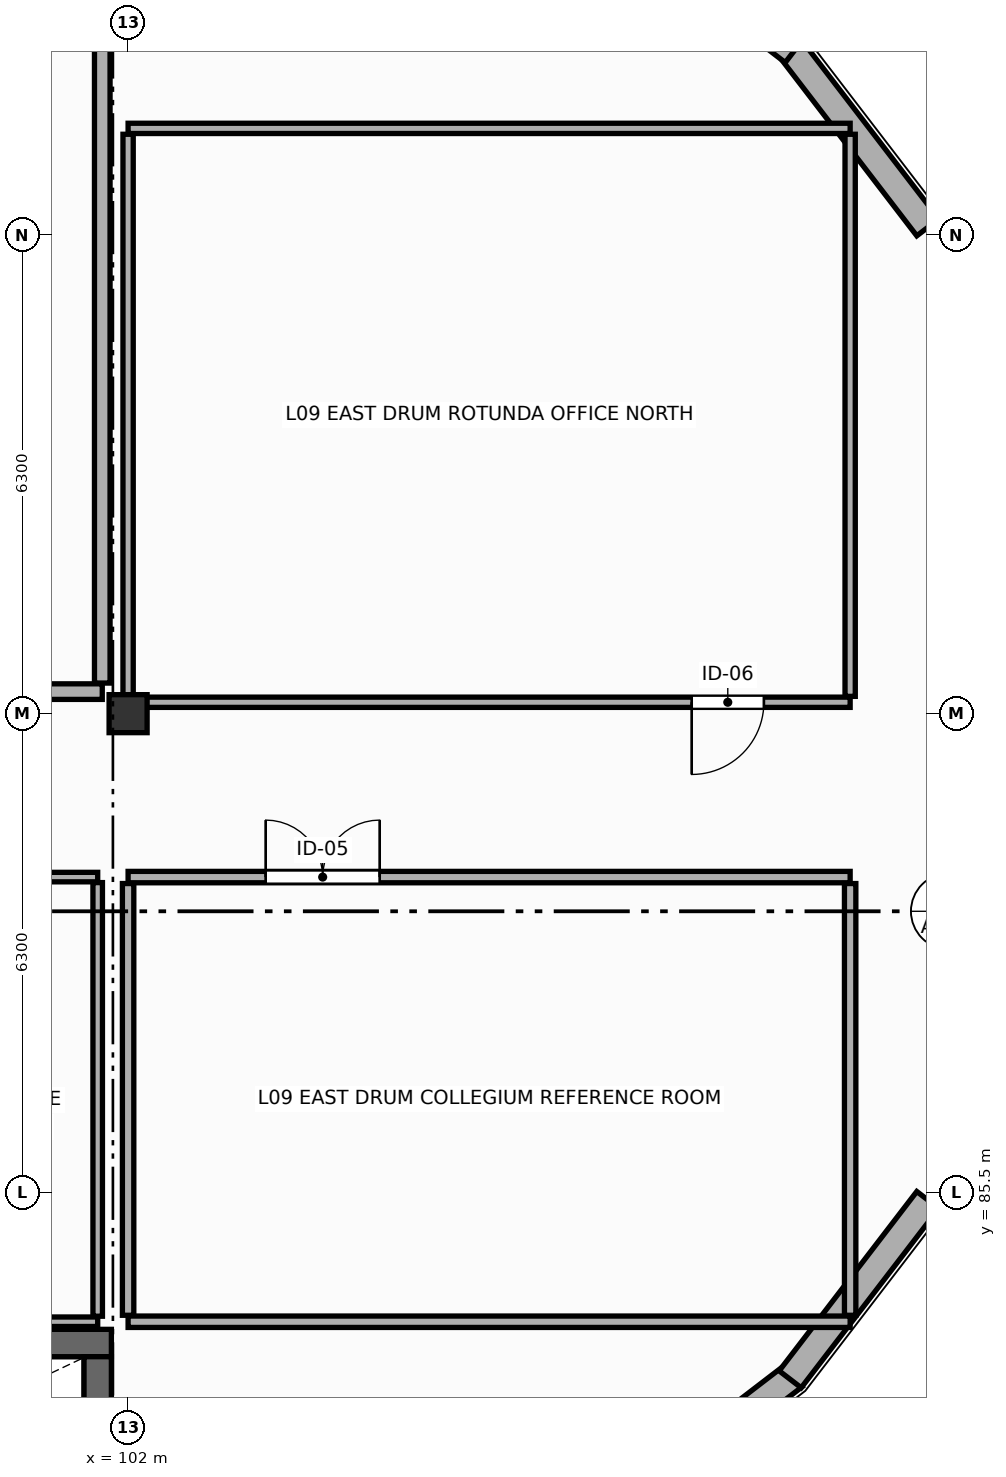
"""IFC4 building model, lengths in metres.
Left out: names, types, materials, properties, quantities, classifications, styles, units other than length and angle.
Written with IfcOpenShell. Run it as: python <this file> out.ifc"""

import sys

from ifc_helpers import new_model, si_unit, direction, frame, frame_2d, origin, origin_2d, place, context, subcontext, project, spatial, rectangle, extrude, element, fill, save


model = new_model("IFC4")
c1 = context("Model", 3, precision=1e-05, world=origin(), true_north=direction((0.0, 1.0)))
c2 = subcontext(c1, "Body", "Model", "MODEL_VIEW")
j1 = project(units=[si_unit("LENGTHUNIT", "METRE"), si_unit("PLANEANGLEUNIT", "RADIAN")], contexts=[c1])
p1 = place(None, origin())
s1 = spatial("IfcSite", under=j1, at=p1, CompositionType="ELEMENT")
p2 = place(p1, origin())
s2 = spatial("IfcBuilding", under=s1, at=p2, CompositionType="ELEMENT")
p3 = place(p2, frame((0.0, 0.0, 35.4)))
s3 = spatial("IfcBuildingStorey", under=s2, at=p3, CompositionType="ELEMENT", Elevation=35.4)
p4 = place(p3, frame((102.0, 91.8, 0.0), z_axis=(0.0, 0.0, 1.0), x_axis=(1.0, 0.0, 0.0)))
e1 = element("IfcColumn", 1, at=p4, inside=s3, PredefinedType="COLUMN", context=c2, shape_type="SweptSolid", body=[
    extrude(rectangle(XDim=0.5, YDim=0.5, at=origin_2d()), origin(), (0.0, 0.0, 1.0), 4.2),
])
p5 = place(p3, frame((108.398, 81.278, 0.0), z_axis=(0.0, 0.0, 1.0), x_axis=(0.793361877219, 0.608750303306, 0.0)))
e2 = element("IfcWall", 2, at=p5, inside=s3, PredefinedType="ELEMENTEDWALL", context=c2, shape_type="SweptSolid", body=[
    extrude(rectangle(XDim=2.974, YDim=0.365, at=frame_2d((1.487, 0.0))), origin(), (0.0, 0.0, 1.0), 2.995),
])
p6 = place(p5, frame((1.087, 0.0, 0.85)))
e3 = element("IfcOpeningElement", 3, at=p6, cuts=e2, PredefinedType="OPENING", context=c2, shape_type="SweptSolid", body=[
    extrude(rectangle(XDim=0.8, YDim=1.7, at=frame_2d((0.4, 0.85))), frame((0.0, 0.192, 0.0), z_axis=(0.0, -1.0, 0.0), x_axis=(1.0, 0.0, 0.0)), (0.0, 0.0, 1.0), 0.385),
])
p7 = place(p3, frame((110.711, 83.042, 0.0), z_axis=(0.0, 0.0, 1.0), x_axis=(0.608710660898, 0.793392293452, 0.0)))
e4 = element("IfcWall", 4, at=p7, inside=s3, PredefinedType="ELEMENTEDWALL", context=c2, shape_type="SweptSolid", body=[
    extrude(rectangle(XDim=2.974, YDim=0.365, at=frame_2d((1.487, 0.0))), origin(), (0.0, 0.0, 1.0), 3.095),
])
p8 = place(p3, frame((112.522, 98.198, 0.0), z_axis=(0.0, 0.0, 1.0), x_axis=(-0.608750303306, 0.793361877219, 0.0)))
e5 = element("IfcWall", 5, at=p8, inside=s3, PredefinedType="ELEMENTEDWALL", context=c2, shape_type="SweptSolid", body=[
    extrude(rectangle(XDim=2.974, YDim=0.365, at=frame_2d((1.487, 0.0))), origin(), (0.0, 0.0, 1.0), 3.095),
])
p9 = place(p3, frame((110.757, 100.511, 0.0), z_axis=(0.0, 0.0, 1.0), x_axis=(-0.793361877219, 0.608750303306, 0.0)))
e6 = element("IfcWall", 6, at=p9, inside=s3, PredefinedType="ELEMENTEDWALL", context=c2, shape_type="SweptSolid", body=[
    extrude(rectangle(XDim=2.974, YDim=0.365, at=frame_2d((1.487, 0.0))), origin(), (0.0, 0.0, 1.0), 2.995),
])
p10 = place(p9, frame((1.087, 0.0, 0.85)))
e7 = element("IfcOpeningElement", 7, at=p10, cuts=e6, PredefinedType="OPENING", context=c2, shape_type="SweptSolid", body=[
    extrude(rectangle(XDim=0.8, YDim=1.7, at=frame_2d((0.4, 0.85))), frame((0.0, 0.192, 0.0), z_axis=(0.0, -1.0, 0.0), x_axis=(1.0, 0.0, 0.0)), (0.0, 0.0, 1.0), 0.385),
])
p11 = place(p3, frame((102.0, 103.9, 4.2), z_axis=(0.0, 0.0, 1.0), x_axis=(0.0, -1.0, 0.0)))
e8 = element("IfcWall", 8, at=p11, inside=s3, PredefinedType="PARAPET", context=c2, shape_type="SweptSolid", body=[
    extrude(rectangle(XDim=24.2, YDim=0.245, at=frame_2d((12.1, 0.0))), origin(), (0.0, 0.0, 1.0), 1.15),
])
p12 = place(p3, frame((92.42, 83.52, 0.0), z_axis=(0.0, 0.0, 1.0), x_axis=(1.0, 0.0, 0.0)))
e9 = element("IfcWall", 9, at=p12, inside=s3, PredefinedType="SHEAR", context=c2, shape_type="SweptSolid", body=[
    extrude(rectangle(XDim=9.36, YDim=0.36, at=frame_2d((4.68, 0.0))), origin(), (0.0, 0.0, 1.0), 3.98),
])
p13 = place(p3, frame((101.6, 83.34, 0.0), z_axis=(0.0, 0.0, 1.0), x_axis=(0.0, -1.0, 0.0)))
e10 = element("IfcWall", 10, at=p13, inside=s3, PredefinedType="SHEAR", context=c2, shape_type="SweptSolid", body=[
    extrude(rectangle(XDim=3.36, YDim=0.36, at=frame_2d((1.68, 0.0))), origin(), (0.0, 0.0, 1.0), 3.98),
])
p14 = place(p3, frame((99.1, 89.65, 0.0), z_axis=(0.0, 0.0, 1.0), x_axis=(1.0, 0.0, 0.0)))
e11 = element("IfcWall", 11, at=p14, inside=s3, PredefinedType="PARTITIONING", context=c2, shape_type="SweptSolid", body=[
    extrude(rectangle(XDim=2.5, YDim=0.125, at=frame_2d((1.25, 0.0))), origin(), (0.0, 0.0, 1.0), 3.095),
])
p15 = place(p14, frame((0.75, 0.0, 0.0)))
e12 = element("IfcOpeningElement", 12, at=p15, cuts=e11, PredefinedType="OPENING", context=c2, shape_type="SweptSolid", body=[
    extrude(rectangle(XDim=1.0, YDim=2.1, at=frame_2d((0.5, 1.05))), frame((0.0, 0.073, 0.0), z_axis=(0.0, -1.0, 0.0), x_axis=(1.0, 0.0, 0.0)), (0.0, 0.0, 1.0), 0.145),
])
p16 = place(p3, frame((101.6, 83.8, 0.0), z_axis=(0.0, 0.0, 1.0), x_axis=(-1.0, 0.0, 0.0)))
e13 = element("IfcWall", 13, at=p16, inside=s3, PredefinedType="PARTITIONING", context=c2, shape_type="SweptSolid", body=[
    extrude(rectangle(XDim=2.5, YDim=0.125, at=frame_2d((1.25, 0.0))), origin(), (0.0, 0.0, 1.0), 3.095),
])
p17 = place(p3, frame((101.6, 89.577, 0.0), z_axis=(0.0, 0.0, 1.0), x_axis=(0.0, -1.0, 0.0)))
e14 = element("IfcWall", 14, at=p17, inside=s3, PredefinedType="PARTITIONING", context=c2, shape_type="SweptSolid", body=[
    extrude(rectangle(XDim=5.705, YDim=0.125, at=frame_2d((2.853, 0.0))), origin(), (0.0, 0.0, 1.0), 3.095),
])
p18 = place(p3, frame((101.66, 92.09, 0.0), z_axis=(0.0, 0.0, 1.0), x_axis=(-1.0, 0.0, 0.0)))
e15 = element("IfcWall", 15, at=p18, inside=s3, PredefinedType="STANDARD", context=c2, shape_type="SweptSolid", body=[
    extrude(rectangle(XDim=5.634, YDim=0.205, at=frame_2d((2.817, 0.0))), origin(), (0.0, 0.0, 1.0), 3.095),
])
p19 = place(p18, frame((2.47, 0.0, 0.0)))
e16 = element("IfcOpeningElement", 16, at=p19, cuts=e15, PredefinedType="OPENING", context=c2, shape_type="SweptSolid", body=[
    extrude(rectangle(XDim=1.4, YDim=2.25, at=frame_2d((0.7, 1.125))), frame((0.0, 0.113, 0.0), z_axis=(0.0, -1.0, 0.0), x_axis=(1.0, 0.0, 0.0)), (0.0, 0.0, 1.0), 0.225),
])
p20 = place(p3, frame((101.66, 103.996, 0.0), z_axis=(0.0, 0.0, 1.0), x_axis=(0.0, -1.0, 0.0)))
e17 = element("IfcWall", 17, at=p20, inside=s3, PredefinedType="STANDARD", context=c2, shape_type="SweptSolid", body=[
    extrude(rectangle(XDim=11.794, YDim=0.205, at=frame_2d((5.897, 0.0))), origin(), (0.0, 0.0, 1.0), 3.095),
])
p21 = place(p3, frame((102.0, 99.5, 0.0), z_axis=(0.0, 0.0, 1.0), x_axis=(1.0, 0.0, 0.0)))
e18 = element("IfcWall", 18, at=p21, inside=s3, PredefinedType="PARTITIONING", context=c2, shape_type="SweptSolid", body=[
    extrude(rectangle(XDim=9.5, YDim=0.135, at=frame_2d((4.75, 0.0))), origin(), (0.0, 0.0, 1.0), 2.995),
])
p22 = place(p3, frame((111.5, 91.95, 0.0), z_axis=(0.0, 0.0, 1.0), x_axis=(-1.0, 0.0, 0.0)))
e19 = element("IfcWall", 19, at=p22, inside=s3, PredefinedType="PARTITIONING", context=c2, shape_type="SweptSolid", body=[
    extrude(rectangle(XDim=9.5, YDim=0.135, at=frame_2d((4.75, 0.0))), origin(), (0.0, 0.0, 1.0), 2.995),
])
p23 = place(p22, frame((1.135, 0.0, 0.0)))
e20 = element("IfcOpeningElement", 20, at=p23, cuts=e19, PredefinedType="OPENING", context=c2, shape_type="SweptSolid", body=[
    extrude(rectangle(XDim=0.95, YDim=2.15, at=frame_2d((0.475, 1.075))), frame((0.0, 0.077, 0.0), z_axis=(0.0, -1.0, 0.0), x_axis=(1.0, 0.0, 0.0)), (0.0, 0.0, 1.0), 0.155),
])
for number, where, z_axis, x_axis in (
    (21, (102.0, 92.028, 0.0), (0.0, 0.0, 1.0), (0.0, 1.0, 0.0)),
    (22, (111.5, 99.423, 0.0), (0.0, 0.0, 1.0), (0.0, -1.0, 0.0)),
):
    element("IfcWall", number, at=place(p3, frame(where, z_axis=z_axis, x_axis=x_axis)), inside=s3, PredefinedType="PARTITIONING", context=c2, shape_type="SweptSolid", body=[
        extrude(rectangle(XDim=7.395, YDim=0.135, at=frame_2d((3.698, 0.0))), origin(), (0.0, 0.0, 1.0), 3.095),
    ])
p24 = place(p3, frame((102.0, 89.65, 0.0), z_axis=(0.0, 0.0, 1.0), x_axis=(1.0, 0.0, 0.0)))
e23 = element("IfcWall", 23, at=p24, inside=s3, PredefinedType="PARTITIONING", context=c2, shape_type="SweptSolid", body=[
    extrude(rectangle(XDim=9.5, YDim=0.15, at=frame_2d((4.75, 0.0))), origin(), (0.0, 0.0, 1.0), 2.995),
])
p25 = place(p24, frame((1.81, 0.0, 0.0)))
e24 = element("IfcOpeningElement", 24, at=p25, cuts=e23, PredefinedType="OPENING", context=c2, shape_type="SweptSolid", body=[
    extrude(rectangle(XDim=1.5, YDim=2.35, at=frame_2d((0.75, 1.175))), frame((0.0, 0.085, 0.0), z_axis=(0.0, -1.0, 0.0), x_axis=(1.0, 0.0, 0.0)), (0.0, 0.0, 1.0), 0.17),
])
p26 = place(p3, frame((111.5, 83.8, 0.0), z_axis=(0.0, 0.0, 1.0), x_axis=(-1.0, 0.0, 0.0)))
e25 = element("IfcWall", 25, at=p26, inside=s3, PredefinedType="PARTITIONING", context=c2, shape_type="SweptSolid", body=[
    extrude(rectangle(XDim=9.5, YDim=0.15, at=frame_2d((4.75, 0.0))), origin(), (0.0, 0.0, 1.0), 2.995),
])
p27 = place(p3, frame((102.0, 83.885, 0.0), z_axis=(0.0, 0.0, 1.0), x_axis=(0.0, 1.0, 0.0)))
e26 = element("IfcWall", 26, at=p27, inside=s3, PredefinedType="PARTITIONING", context=c2, shape_type="SweptSolid", body=[
    extrude(rectangle(XDim=5.68, YDim=0.15, at=frame_2d((2.84, 0.0))), origin(), (0.0, 0.0, 1.0), 3.095),
])
p28 = place(p3, frame((111.5, 89.565, 0.0), z_axis=(0.0, 0.0, 1.0), x_axis=(0.0, -1.0, 0.0)))
e27 = element("IfcWall", 27, at=p28, inside=s3, PredefinedType="PARTITIONING", context=c2, shape_type="SweptSolid", body=[
    extrude(rectangle(XDim=5.68, YDim=0.15, at=frame_2d((2.84, 0.0))), origin(), (0.0, 0.0, 1.0), 3.595),
])
p29 = place(p23, origin())
e28 = element("IfcDoor", 28, at=p29, inside=s3, OperationType="SINGLE_SWING_RIGHT", PredefinedType="DOOR", context=c2, shape_type="SweptSolid", body=[
    extrude(rectangle(XDim=0.95, YDim=2.15, at=frame_2d((0.475, 1.075))), frame((0.0, 0.025, 0.0), z_axis=(0.0, -1.0, 0.0), x_axis=(1.0, 0.0, 0.0)), (0.0, 0.0, 1.0), 0.05),
])
fill(e20, e28)
p30 = place(p25, origin())
e29 = element("IfcDoor", 29, at=p30, inside=s3, OperationType="DOUBLE_DOOR_SINGLE_SWING", PredefinedType="DOOR", context=c2, shape_type="SweptSolid", body=[
    extrude(rectangle(XDim=1.5, YDim=2.35, at=frame_2d((0.75, 1.175))), frame((0.0, 0.025, 0.0), z_axis=(0.0, -1.0, 0.0), x_axis=(1.0, 0.0, 0.0)), (0.0, 0.0, 1.0), 0.05),
])
fill(e24, e29)
save(model, sys.argv[1])
